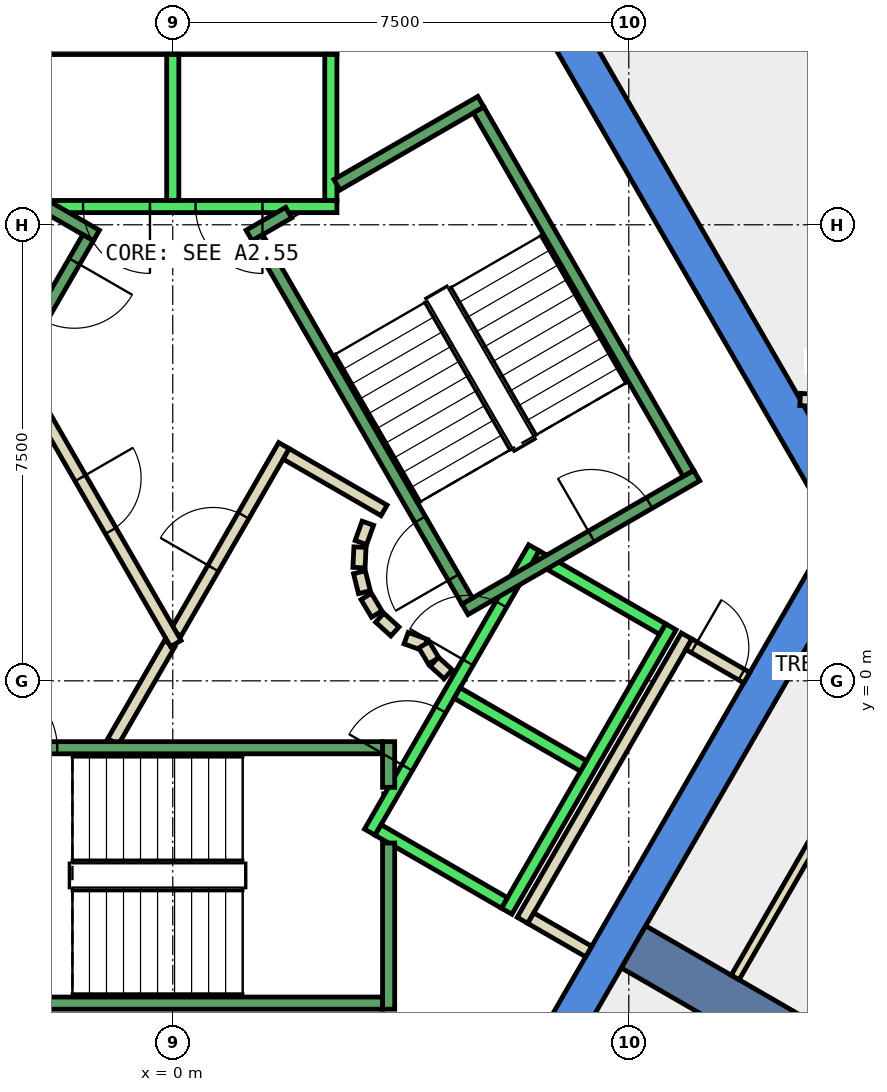
"""IFC4 building model, lengths in metres.
Left out: names, types, materials, properties, quantities, classifications, styles, units other than length and angle.
Written with IfcOpenShell. Run it as: python <this file> out.ifc"""

import sys

from ifc_helpers import new_model, si_unit, direction, frame, frame_2d, origin, place, context, subcontext, project, spatial, polyline, rectangle, outline, extrude, element, fill, save


model = new_model("IFC4")
c1 = context("Model", 3, precision=1e-05, world=origin(), true_north=direction((0.0, 1.0)))
c2 = subcontext(c1, "Body", "Model", "MODEL_VIEW")
j1 = project(units=[si_unit("LENGTHUNIT", "METRE"), si_unit("PLANEANGLEUNIT", "RADIAN")], contexts=[c1])
p1 = place(None, origin())
s1 = spatial("IfcSite", under=j1, at=p1, CompositionType="ELEMENT")
p2 = place(p1, origin())
s2 = spatial("IfcBuilding", under=s1, at=p2, CompositionType="ELEMENT")
p3 = place(p2, frame((0.0, 0.0, 263.0)))
s3 = spatial("IfcBuildingStorey", under=s2, at=p3, CompositionType="ELEMENT", Elevation=263.0)
p4 = place(p3, frame((0.0, 0.0, -0.34)))
e1 = element("IfcWall", 1, at=p4, inside=s3, PredefinedType="SHEAR", context=c2, shape_type="SweptSolid", body=[
    extrude(outline(polyline([(6.786, 10.747), (6.266, 10.447), (10.854, 2.5), (11.547, 2.5), (6.786, 10.747)])), origin(), (0.0, 0.0, 1.0), 3.6),
])
p5 = place(p3, frame((0.0, 0.0, -0.34)))
e2 = element("IfcWall", 2, at=p5, inside=s3, PredefinedType="SHEAR", context=c2, shape_type="SweptSolid", body=[
    extrude(outline(polyline([(5.774, -7.5), (11.547, 2.5), (10.854, 2.5), (5.427, -6.9), (5.774, -7.5)])), origin(), (0.0, 0.0, 1.0), 3.6),
])
p6 = place(p3, frame((7.578, -4.375, -0.34), z_axis=(0.0, 0.0, 1.0), x_axis=(0.866024315419, -0.5000018851, 0.0)))
e3 = element("IfcWall", 3, at=p6, inside=s3, PredefinedType="SHEAR", context=c2, shape_type="SweptSolid", body=[
    extrude(rectangle(XDim=9.0, YDim=0.8, at=frame_2d((4.5, 0.0))), origin(), (0.0, 0.0, 1.0), 3.6),
])
p7 = place(p3, frame((11.902, 4.521, 0.0), z_axis=(0.0, 0.0, 1.0), x_axis=(-0.997726217037, 0.067397298437, 0.0)))
e4 = element("IfcWall", 4, at=p7, inside=s3, PredefinedType="PARTITIONING", context=c2, shape_type="SweptSolid", body=[
    extrude(rectangle(XDim=1.587, YDim=0.2, at=frame_2d((0.793, 0.0))), origin(), (0.0, 0.0, 1.0), 3.26),
])
p8 = place(p7, frame((0.293, 0.0, 0.0)))
e5 = element("IfcOpeningElement", 5, at=p8, cuts=e4, PredefinedType="OPENING", context=c2, shape_type="SweptSolid", body=[
    extrude(rectangle(XDim=1.0, YDim=2.1, at=frame_2d((0.5, 1.05))), frame((0.0, 0.11, 0.0), z_axis=(0.0, -1.0, 0.0), x_axis=(1.0, 0.0, 0.0)), (0.0, 0.0, 1.0), 0.22),
])
p9 = place(p3, frame((9.281, 12.779, 0.0), z_axis=(0.0, 0.0, 1.0), x_axis=(0.515568955032, -0.856848091908, 0.0)))
e6 = element("IfcWall", 6, at=p9, inside=s3, PredefinedType="PARTITIONING", context=c2, shape_type="SweptSolid", body=[
    extrude(rectangle(XDim=3.177, YDim=0.2, at=frame_2d((1.588, 0.0))), origin(), (0.0, 0.0, 1.0), 3.26),
])
p10 = place(p3, frame((5.751, -3.938, 0.0), z_axis=(0.0, 0.0, 1.0), x_axis=(0.500034260056, 0.866005622828, 0.0)))
e7 = element("IfcWall", 7, at=p10, inside=s3, PredefinedType="PARTITIONING", context=c2, shape_type="SweptSolid", body=[
    extrude(rectangle(XDim=5.399, YDim=0.2, at=frame_2d((2.7, 0.0))), origin(), (0.0, 0.0, 1.0), 3.26),
])
p11 = place(p3, frame((8.488, 0.602, 0.0), z_axis=(0.0, 0.0, 1.0), x_axis=(0.866063652425, -0.499933745558, 0.0)))
e8 = element("IfcWall", 8, at=p11, inside=s3, PredefinedType="PARTITIONING", context=c2, shape_type="SweptSolid", body=[
    extrude(rectangle(XDim=1.1, YDim=0.2, at=frame_2d((0.55, 0.0))), origin(), (0.0, 0.0, 1.0), 3.26),
])
p12 = place(p11, frame((0.1, 0.0, 0.0)))
e9 = element("IfcOpeningElement", 9, at=p12, cuts=e8, PredefinedType="OPENING", context=c2, shape_type="SweptSolid", body=[
    extrude(rectangle(XDim=0.9, YDim=2.1, at=frame_2d((0.45, 1.05))), frame((0.0, 0.11, 0.0), z_axis=(0.0, -1.0, 0.0), x_axis=(1.0, 0.0, 0.0)), (0.0, 0.0, 1.0), 0.22),
])
p13 = place(p3, frame((6.841, -4.452, 0.0), z_axis=(0.0, 0.0, 1.0), x_axis=(-0.86621513555, 0.499671230855, 0.0)))
e10 = element("IfcWall", 10, at=p13, inside=s3, PredefinedType="PARTITIONING", context=c2, shape_type="SweptSolid", body=[
    extrude(rectangle(XDim=1.1, YDim=0.2, at=frame_2d((0.55, 0.0))), origin(), (0.0, 0.0, 1.0), 3.26),
])
p14 = place(p3, frame((-0.982, -1.0, 0.0), z_axis=(0.0, 0.0, 1.0), x_axis=(0.50024047865, 0.865886518847, 0.0)))
e11 = element("IfcWall", 11, at=p14, inside=s3, PredefinedType="PARTITIONING", context=c2, shape_type="SweptSolid", body=[
    extrude(rectangle(XDim=1.863, YDim=0.2, at=frame_2d((0.931, 0.0))), origin(), (0.0, 0.0, 1.0), 3.26),
])
p15 = place(p3, frame((0.05, 0.787, 0.0), z_axis=(0.0, 0.0, 1.0), x_axis=(0.499954076797, 0.866051915934, 0.0)))
e12 = element("IfcWall", 12, at=p15, inside=s3, PredefinedType="PARTITIONING", context=c2, shape_type="SweptSolid", body=[
    extrude(rectangle(XDim=3.558, YDim=0.2, at=frame_2d((1.779, 0.0))), origin(), (0.0, 0.0, 1.0), 3.26),
])
p16 = place(p15, frame((1.229, 0.0, 0.0)))
e13 = element("IfcOpeningElement", 13, at=p16, cuts=e12, PredefinedType="OPENING", context=c2, shape_type="SweptSolid", body=[
    extrude(rectangle(XDim=1.0, YDim=2.1, at=frame_2d((0.5, 1.05))), frame((0.0, 0.11, 0.0), z_axis=(0.0, -1.0, 0.0), x_axis=(1.0, 0.0, 0.0)), (0.0, 0.0, 1.0), 0.22),
])
p17 = place(p3, frame((1.866, 3.732, 0.0), z_axis=(0.0, 0.0, 1.0), x_axis=(0.866043361281, -0.499968895414, 0.0)))
e14 = element("IfcWall", 14, at=p17, inside=s3, PredefinedType="PARTITIONING", context=c2, shape_type="SweptSolid", body=[
    extrude(rectangle(XDim=1.858, YDim=0.2, at=frame_2d((0.929, 0.0))), origin(), (0.0, 0.0, 1.0), 3.26),
])
p18 = place(p3, frame((3.208, 2.592, 0.0), z_axis=(0.0, 0.0, 1.0), x_axis=(-0.337388820924, -0.941365382578, 0.0)))
e15 = element("IfcWall", 15, at=p18, inside=s3, PredefinedType="PARTITIONING", context=c2, shape_type="SweptSolid", body=[
    extrude(rectangle(XDim=0.338, YDim=0.2, at=frame_2d((0.169, 0.0))), origin(), (0.0, 0.0, 1.0), 3.26),
])
p19 = place(p3, frame((3.079, 2.199, 0.0), z_axis=(0.0, 0.0, 1.0), x_axis=(-0.047771483479, -0.998858290933, 0.0)))
e16 = element("IfcWall", 16, at=p19, inside=s3, PredefinedType="PARTITIONING", context=c2, shape_type="SweptSolid", body=[
    extrude(rectangle(XDim=0.337, YDim=0.2, at=frame_2d((0.169, 0.0))), origin(), (0.0, 0.0, 1.0), 3.26),
])
p20 = place(p3, frame((3.07, 1.786, 0.0), z_axis=(0.0, 0.0, 1.0), x_axis=(0.242705583207, -0.970099994784, 0.0)))
e17 = element("IfcWall", 17, at=p20, inside=s3, PredefinedType="PARTITIONING", context=c2, shape_type="SweptSolid", body=[
    extrude(rectangle(XDim=0.338, YDim=0.2, at=frame_2d((0.169, 0.0))), origin(), (0.0, 0.0, 1.0), 3.26),
])
for number, where, z_axis, x_axis in (
    (18, (3.182, 1.388, 0.0), (0.0, 0.0, 1.0), (0.512, -0.859, 0.0)),
    (19, (3.404, 1.039, 0.0), (0.0, 0.0, 1.0), (0.74, -0.672, 0.0)),
):
    element("IfcWall", number, at=place(p3, frame(where, z_axis=z_axis, x_axis=x_axis)), inside=s3, PredefinedType="PARTITIONING", context=c2, shape_type="SweptSolid", body=[
        extrude(rectangle(XDim=0.338, YDim=0.2, at=frame_2d((0.169, 0.0))), origin(), (0.0, 0.0, 1.0), 3.26),
    ])
p21 = place(p3, frame((3.838, 0.702, 0.0), z_axis=(0.0, 0.0, 1.0), x_axis=(0.941035081519, -0.338308993895, 0.0)))
e20 = element("IfcWall", 20, at=p21, inside=s3, PredefinedType="PARTITIONING", context=c2, shape_type="SweptSolid", body=[
    extrude(rectangle(XDim=0.337, YDim=0.2, at=frame_2d((0.168, 0.0))), origin(), (0.0, 0.0, 1.0), 3.26),
])
p22 = place(p3, frame((4.132, 0.593, 0.0), z_axis=(0.0, 0.0, 1.0), x_axis=(0.513561617048, -0.858052717201, 0.0)))
e21 = element("IfcWall", 21, at=p22, inside=s3, PredefinedType="PARTITIONING", context=c2, shape_type="SweptSolid", body=[
    extrude(rectangle(XDim=0.308, YDim=0.2, at=frame_2d((0.154, 0.0))), origin(), (0.0, 0.0, 1.0), 3.26),
])
p23 = place(p3, frame((4.301, 0.315, 0.0), z_axis=(0.0, 0.0, 1.0), x_axis=(0.741798017506, -0.670623367639, 0.0)))
e22 = element("IfcWall", 22, at=p23, inside=s3, PredefinedType="PARTITIONING", context=c2, shape_type="SweptSolid", body=[
    extrude(rectangle(XDim=0.309, YDim=0.2, at=frame_2d((0.154, 0.0))), origin(), (0.0, 0.0, 1.0), 3.26),
])
p24 = place(p3, frame((-2.54, 5.1, 0.0), z_axis=(0.0, 0.0, 1.0), x_axis=(0.499925051871, -0.866068670783, 0.0)))
e23 = element("IfcWall", 23, at=p24, inside=s3, PredefinedType="PARTITIONING", context=c2, shape_type="SweptSolid", body=[
    extrude(rectangle(XDim=5.181, YDim=0.2, at=frame_2d((2.59, 0.0))), origin(), (0.0, 0.0, 1.0), 3.26),
])
p25 = place(p24, frame((2.04, 0.0, 0.0)))
e24 = element("IfcOpeningElement", 24, at=p25, cuts=e23, PredefinedType="OPENING", context=c2, shape_type="SweptSolid", body=[
    extrude(rectangle(XDim=1.0, YDim=2.1, at=frame_2d((0.5, 1.05))), frame((0.0, 0.11, 0.0), z_axis=(0.0, -1.0, 0.0), x_axis=(1.0, 0.0, 0.0)), (0.0, 0.0, 1.0), 0.22),
])
p26 = place(p3, frame((9.25, -4.878, 0.0), z_axis=(0.0, 0.0, 1.0), x_axis=(0.499982416899, 0.866035555154, 0.0)))
e25 = element("IfcWall", 25, at=p26, inside=s3, PredefinedType="PARTITIONING", context=c2, shape_type="SweptSolid", body=[
    extrude(rectangle(XDim=8.048, YDim=0.15, at=frame_2d((4.024, 0.0))), origin(), (0.0, 0.0, 1.0), 3.26),
])
p27 = place(p3, frame((2.7, 7.8, 0.0), z_axis=(0.0, 0.0, 1.0), x_axis=(-1.0, 0.0, 0.0)))
e26 = element("IfcWall", 26, at=p27, inside=s3, PredefinedType="STANDARD", context=c2, shape_type="SweptSolid", body=[
    extrude(rectangle(XDim=5.4, YDim=0.2, at=frame_2d((2.7, 0.0))), origin(), (0.0, 0.0, 1.0), 3.26),
])
p28 = place(p27, frame((1.225, 0.0, 0.0)))
e27 = element("IfcOpeningElement", 27, at=p28, cuts=e26, PredefinedType="OPENING", context=c2, shape_type="SweptSolid", body=[
    extrude(rectangle(XDim=1.1, YDim=2.1, at=frame_2d((0.55, 1.05))), frame((0.0, 0.11, 0.0), z_axis=(0.0, -1.0, 0.0), x_axis=(1.0, 0.0, 0.0)), (0.0, 0.0, 1.0), 0.22),
])
p29 = place(p27, frame((3.075, 0.0, 0.0)))
e28 = element("IfcOpeningElement", 28, at=p29, cuts=e26, PredefinedType="OPENING", context=c2, shape_type="SweptSolid", body=[
    extrude(rectangle(XDim=1.1, YDim=2.1, at=frame_2d((0.55, 1.05))), frame((0.0, 0.11, 0.0), z_axis=(0.0, -1.0, 0.0), x_axis=(1.0, 0.0, 0.0)), (0.0, 0.0, 1.0), 0.22),
])
p30 = place(p3, frame((2.7, 10.4, 0.0), z_axis=(0.0, 0.0, 1.0), x_axis=(-1.0, 0.0, 0.0)))
e29 = element("IfcWall", 29, at=p30, inside=s3, PredefinedType="STANDARD", context=c2, shape_type="SweptSolid", body=[
    extrude(rectangle(XDim=5.4, YDim=0.2, at=frame_2d((2.7, 0.0))), origin(), (0.0, 0.0, 1.0), 3.26),
])
for number, where, z_axis, x_axis in (
    (30, (2.6, 7.9, 0.0), (0.0, 0.0, 1.0), (0.0, 1.0, 0.0)),
    (31, (0.0, 7.9, 0.0), (0.0, 0.0, 1.0), (0.0, 1.0, 0.0)),
):
    element("IfcWall", number, at=place(p3, frame(where, z_axis=z_axis, x_axis=x_axis)), inside=s3, PredefinedType="STANDARD", context=c2, shape_type="SweptSolid", body=[
        extrude(rectangle(XDim=2.4, YDim=0.2, at=frame_2d((1.2, 0.0))), origin(), (0.0, 0.0, 1.0), 3.26),
    ])
p31 = place(p3, frame((3.24, -2.488, 0.0), z_axis=(0.0, 0.0, 1.0), x_axis=(0.500034260056, 0.866005622828, 0.0)))
e32 = element("IfcWall", 32, at=p31, inside=s3, PredefinedType="STANDARD", context=c2, shape_type="SweptSolid", body=[
    extrude(rectangle(XDim=5.399, YDim=0.2, at=frame_2d((2.7, 0.0))), origin(), (0.0, 0.0, 1.0), 3.26),
])
p32 = place(p31, frame((3.225, 0.0, 0.0)))
e33 = element("IfcOpeningElement", 33, at=p32, cuts=e32, PredefinedType="OPENING", context=c2, shape_type="SweptSolid", body=[
    extrude(rectangle(XDim=1.1, YDim=2.1, at=frame_2d((0.55, 1.05))), frame((0.0, 0.11, 0.0), z_axis=(0.0, -1.0, 0.0), x_axis=(1.0, 0.0, 0.0)), (0.0, 0.0, 1.0), 0.22),
])
p33 = place(p31, frame((1.225, 0.0, 0.0)))
e34 = element("IfcOpeningElement", 34, at=p33, cuts=e32, PredefinedType="OPENING", context=c2, shape_type="SweptSolid", body=[
    extrude(rectangle(XDim=1.1, YDim=2.1, at=frame_2d((0.55, 1.05))), frame((0.0, 0.11, 0.0), z_axis=(0.0, -1.0, 0.0), x_axis=(1.0, 0.0, 0.0)), (0.0, 0.0, 1.0), 0.22),
])
p34 = place(p3, frame((5.492, -3.788, 0.0), z_axis=(0.0, 0.0, 1.0), x_axis=(0.500034260056, 0.866005622828, 0.0)))
e35 = element("IfcWall", 35, at=p34, inside=s3, PredefinedType="STANDARD", context=c2, shape_type="SweptSolid", body=[
    extrude(rectangle(XDim=5.399, YDim=0.2, at=frame_2d((2.7, 0.0))), origin(), (0.0, 0.0, 1.0), 3.26),
])
p35 = place(p3, frame((3.377, -2.452, 0.0), z_axis=(0.0, 0.0, 1.0), x_axis=(0.865955154139, -0.50012165622, 0.0)))
e36 = element("IfcWall", 36, at=p35, inside=s3, PredefinedType="STANDARD", context=c2, shape_type="SweptSolid", body=[
    extrude(rectangle(XDim=2.4, YDim=0.2, at=frame_2d((1.2, 0.0))), origin(), (0.0, 0.0, 1.0), 3.26),
])
for number, where, z_axis, x_axis in (
    (37, (4.677, -0.2, 0.0), (0.0, 0.0, 1.0), (0.866, -0.5, 0.0)),
    (38, (5.977, 2.052, 0.0), (0.0, 0.0, 1.0), (0.866, -0.5, 0.0)),
):
    element("IfcWall", number, at=place(p3, frame(where, z_axis=z_axis, x_axis=x_axis)), inside=s3, PredefinedType="STANDARD", context=c2, shape_type="SweptSolid", body=[
        extrude(rectangle(XDim=2.399, YDim=0.2, at=frame_2d((1.2, 0.0))), origin(), (0.0, 0.0, 1.0), 3.26),
    ])
p36 = place(p3, frame((3.55, -2.667, 0.0), z_axis=(0.0, 0.0, 1.0), x_axis=(0.0, -1.0, 0.0)))
e39 = element("IfcWall", 39, at=p36, inside=s3, PredefinedType="STANDARD", context=c2, shape_type="SweptSolid", body=[
    extrude(rectangle(XDim=2.733, YDim=0.2, at=frame_2d((1.366, 0.0))), origin(), (0.0, 0.0, 1.0), 3.26),
])
p37 = place(p3, frame((3.55, -1.0, 0.0), z_axis=(0.0, 0.0, 1.0), x_axis=(0.0, -1.0, 0.0)))
e40 = element("IfcWall", 40, at=p37, inside=s3, PredefinedType="STANDARD", context=c2, shape_type="SweptSolid", body=[
    extrude(rectangle(XDim=0.751, YDim=0.2, at=frame_2d((0.375, 0.0))), origin(), (0.0, 0.0, 1.0), 3.26),
])
p38 = place(p3, frame((-3.45, -1.1, 0.0), z_axis=(0.0, 0.0, 1.0), x_axis=(1.0, 0.0, 0.0)))
e41 = element("IfcWall", 41, at=p38, inside=s3, PredefinedType="STANDARD", context=c2, shape_type="SweptSolid", body=[
    extrude(rectangle(XDim=6.9, YDim=0.2, at=frame_2d((3.45, 0.0))), origin(), (0.0, 0.0, 1.0), 3.26),
])
p39 = place(p38, frame((0.45, 0.0, 0.0)))
e42 = element("IfcOpeningElement", 42, at=p39, cuts=e41, PredefinedType="OPENING", context=c2, shape_type="SweptSolid", body=[
    extrude(rectangle(XDim=1.1, YDim=2.2, at=frame_2d((0.55, 1.1))), frame((0.0, 0.11, 0.0), z_axis=(0.0, -1.0, 0.0), x_axis=(1.0, 0.0, 0.0)), (0.0, 0.0, 1.0), 0.22),
])
p40 = place(p3, frame((-3.45, -5.3, 0.0), z_axis=(0.0, 0.0, 1.0), x_axis=(1.0, 0.0, 0.0)))
e43 = element("IfcWall", 43, at=p40, inside=s3, PredefinedType="STANDARD", context=c2, shape_type="SweptSolid", body=[
    extrude(rectangle(XDim=6.9, YDim=0.2, at=frame_2d((3.45, 0.0))), origin(), (0.0, 0.0, 1.0), 3.26),
])
p41 = place(p3, frame((4.806, 1.176, 0.0), z_axis=(0.0, 0.0, 1.0), x_axis=(0.866059941101, 0.499940174841, 0.0)))
e44 = element("IfcWall", 44, at=p41, inside=s3, PredefinedType="STANDARD", context=c2, shape_type="SweptSolid", body=[
    extrude(rectangle(XDim=4.4, YDim=0.2, at=frame_2d((2.2, 0.0))), origin(), (0.0, 0.0, 1.0), 3.26),
])
p42 = place(p41, frame((2.4, 0.0, 0.0)))
e45 = element("IfcOpeningElement", 45, at=p42, cuts=e44, PredefinedType="OPENING", context=c2, shape_type="SweptSolid", body=[
    extrude(rectangle(XDim=1.1, YDim=2.2, at=frame_2d((0.55, 1.1))), frame((0.0, 0.11, 0.0), z_axis=(0.0, -1.0, 0.0), x_axis=(1.0, 0.0, 0.0)), (0.0, 0.0, 1.0), 0.22),
])
p43 = place(p3, frame((2.7, 8.158, 0.0), z_axis=(0.0, 0.0, 1.0), x_axis=(0.86611865017, 0.499838457731, 0.0)))
e46 = element("IfcWall", 46, at=p43, inside=s3, PredefinedType="STANDARD", context=c2, shape_type="SweptSolid", body=[
    extrude(rectangle(XDim=2.733, YDim=0.2, at=frame_2d((1.366, 0.0))), origin(), (0.0, 0.0, 1.0), 3.26),
])
p44 = place(p3, frame((1.256, 7.324, 0.0), z_axis=(0.0, 0.0, 1.0), x_axis=(0.865915093549, 0.500191014278, 0.0)))
e47 = element("IfcWall", 47, at=p44, inside=s3, PredefinedType="STANDARD", context=c2, shape_type="SweptSolid", body=[
    extrude(rectangle(XDim=0.752, YDim=0.2, at=frame_2d((0.376, 0.0))), origin(), (0.0, 0.0, 1.0), 3.26),
])
p45 = place(p3, frame((4.843, 1.312, 0.0), z_axis=(0.0, 0.0, 1.0), x_axis=(-0.499963383562, 0.866046543262, 0.0)))
e48 = element("IfcWall", 48, at=p45, inside=s3, PredefinedType="STANDARD", context=c2, shape_type="SweptSolid", body=[
    extrude(rectangle(XDim=6.9, YDim=0.2, at=frame_2d((3.45, 0.0))), origin(), (0.0, 0.0, 1.0), 3.26),
])
p46 = place(p45, frame((0.45, 0.0, 0.0)))
e49 = element("IfcOpeningElement", 49, at=p46, cuts=e48, PredefinedType="OPENING", context=c2, shape_type="SweptSolid", body=[
    extrude(rectangle(XDim=1.1, YDim=2.2, at=frame_2d((0.55, 1.1))), frame((0.0, 0.11, 0.0), z_axis=(0.0, -1.0, 0.0), x_axis=(1.0, 0.0, 0.0)), (0.0, 0.0, 1.0), 0.22),
])
p47 = place(p3, frame((8.48, 3.412, 0.0), z_axis=(0.0, 0.0, 1.0), x_axis=(-0.499978703459, 0.866037698999, 0.0)))
e50 = element("IfcWall", 50, at=p47, inside=s3, PredefinedType="STANDARD", context=c2, shape_type="SweptSolid", body=[
    extrude(rectangle(XDim=6.9, YDim=0.2, at=frame_2d((3.45, 0.0))), origin(), (0.0, 0.0, 1.0), 3.26),
])
p48 = place(p3, frame((-1.256, 7.324, 0.0), z_axis=(0.0, 0.0, 1.0), x_axis=(-0.866046073146, 0.499964197906, 0.0)))
e51 = element("IfcWall", 51, at=p48, inside=s3, PredefinedType="STANDARD", context=c2, shape_type="SweptSolid", body=[
    extrude(rectangle(XDim=4.4, YDim=0.2, at=frame_2d((2.2, 0.0))), origin(), (0.0, 0.0, 1.0), 3.26),
])
p49 = place(p48, frame((2.4, 0.0, 0.0)))
e52 = element("IfcOpeningElement", 52, at=p49, cuts=e51, PredefinedType="OPENING", context=c2, shape_type="SweptSolid", body=[
    extrude(rectangle(XDim=1.1, YDim=2.2, at=frame_2d((0.55, 1.1))), frame((0.0, 0.11, 0.0), z_axis=(0.0, -1.0, 0.0), x_axis=(1.0, 0.0, 0.0)), (0.0, 0.0, 1.0), 0.22),
])
p50 = place(p3, frame((-1.393, 7.288, 0.0), z_axis=(0.0, 0.0, 1.0), x_axis=(-0.499963383562, -0.866046543262, 0.0)))
e53 = element("IfcWall", 53, at=p50, inside=s3, PredefinedType="STANDARD", context=c2, shape_type="SweptSolid", body=[
    extrude(rectangle(XDim=6.9, YDim=0.2, at=frame_2d((3.45, 0.0))), origin(), (0.0, 0.0, 1.0), 3.26),
])
p51 = place(p50, frame((0.45, 0.0, 0.0)))
e54 = element("IfcOpeningElement", 54, at=p51, cuts=e53, PredefinedType="OPENING", context=c2, shape_type="SweptSolid", body=[
    extrude(rectangle(XDim=1.1, YDim=2.2, at=frame_2d((0.55, 1.1))), frame((0.0, 0.11, 0.0), z_axis=(0.0, -1.0, 0.0), x_axis=(1.0, 0.0, 0.0)), (0.0, 0.0, 1.0), 0.22),
])
p52 = place(p16, origin())
e55 = element("IfcDoor", 55, at=p52, inside=s3, OperationType="SINGLE_SWING_RIGHT", PredefinedType="DOOR", context=c2, shape_type="SweptSolid", body=[
    extrude(rectangle(XDim=1.0, YDim=2.1, at=frame_2d((0.5, 1.05))), frame((0.0, 0.025, 0.0), z_axis=(0.0, -1.0, 0.0), x_axis=(1.0, 0.0, 0.0)), (0.0, 0.0, 1.0), 0.05),
])
fill(e13, e55)
p53 = place(p25, origin())
e56 = element("IfcDoor", 56, at=p53, inside=s3, OperationType="SINGLE_SWING_RIGHT", PredefinedType="DOOR", context=c2, shape_type="SweptSolid", body=[
    extrude(rectangle(XDim=1.0, YDim=2.1, at=frame_2d((0.5, 1.05))), frame((0.0, 0.025, 0.0), z_axis=(0.0, -1.0, 0.0), x_axis=(1.0, 0.0, 0.0)), (0.0, 0.0, 1.0), 0.05),
])
fill(e24, e56)
p54 = place(p12, origin())
e57 = element("IfcDoor", 57, at=p54, inside=s3, OperationType="SINGLE_SWING_RIGHT", PredefinedType="DOOR", context=c2, shape_type="SweptSolid", body=[
    extrude(rectangle(XDim=0.9, YDim=2.1, at=frame_2d((0.45, 1.05))), frame((0.0, 0.025, 0.0), z_axis=(0.0, -1.0, 0.0), x_axis=(1.0, 0.0, 0.0)), (0.0, 0.0, 1.0), 0.05),
])
fill(e9, e57)
p55 = place(p28, origin())
e58 = element("IfcDoor", 58, at=p55, inside=s3, OperationType="SLIDING_TO_LEFT", PredefinedType="DOOR", context=c2, shape_type="SweptSolid", body=[
    extrude(rectangle(XDim=1.1, YDim=2.1, at=frame_2d((0.55, 1.05))), frame((0.0, 0.025, 0.0), z_axis=(0.0, -1.0, 0.0), x_axis=(1.0, 0.0, 0.0)), (0.0, 0.0, 1.0), 0.05),
])
fill(e27, e58)
p56 = place(p29, origin())
e59 = element("IfcDoor", 59, at=p56, inside=s3, OperationType="SLIDING_TO_LEFT", PredefinedType="DOOR", context=c2, shape_type="SweptSolid", body=[
    extrude(rectangle(XDim=1.1, YDim=2.1, at=frame_2d((0.55, 1.05))), frame((0.0, 0.025, 0.0), z_axis=(0.0, -1.0, 0.0), x_axis=(1.0, 0.0, 0.0)), (0.0, 0.0, 1.0), 0.05),
])
fill(e28, e59)
p57 = place(p32, origin())
e60 = element("IfcDoor", 60, at=p57, inside=s3, OperationType="SLIDING_TO_LEFT", PredefinedType="DOOR", context=c2, shape_type="SweptSolid", body=[
    extrude(rectangle(XDim=1.1, YDim=2.1, at=frame_2d((0.55, 1.05))), frame((0.0, 0.025, 0.0), z_axis=(0.0, -1.0, 0.0), x_axis=(1.0, 0.0, 0.0)), (0.0, 0.0, 1.0), 0.05),
])
fill(e33, e60)
p58 = place(p33, origin())
e61 = element("IfcDoor", 61, at=p58, inside=s3, OperationType="SLIDING_TO_LEFT", PredefinedType="DOOR", context=c2, shape_type="SweptSolid", body=[
    extrude(rectangle(XDim=1.1, YDim=2.1, at=frame_2d((0.55, 1.05))), frame((0.0, 0.025, 0.0), z_axis=(0.0, -1.0, 0.0), x_axis=(1.0, 0.0, 0.0)), (0.0, 0.0, 1.0), 0.05),
])
fill(e34, e61)
p59 = place(p39, origin())
e62 = element("IfcDoor", 62, at=p59, inside=s3, OperationType="SINGLE_SWING_LEFT", PredefinedType="DOOR", context=c2, shape_type="SweptSolid", body=[
    extrude(rectangle(XDim=1.1, YDim=2.2, at=frame_2d((0.55, 1.1))), frame((0.0, 0.025, 0.0), z_axis=(0.0, -1.0, 0.0), x_axis=(1.0, 0.0, 0.0)), (0.0, 0.0, 1.0), 0.05),
])
fill(e42, e62)
p60 = place(p46, origin())
e63 = element("IfcDoor", 63, at=p60, inside=s3, OperationType="SINGLE_SWING_LEFT", PredefinedType="DOOR", context=c2, shape_type="SweptSolid", body=[
    extrude(rectangle(XDim=1.1, YDim=2.2, at=frame_2d((0.55, 1.1))), frame((0.0, 0.025, 0.0), z_axis=(0.0, -1.0, 0.0), x_axis=(1.0, 0.0, 0.0)), (0.0, 0.0, 1.0), 0.05),
])
fill(e49, e63)
p61 = place(p42, origin())
e64 = element("IfcDoor", 64, at=p61, inside=s3, OperationType="SINGLE_SWING_LEFT", PredefinedType="DOOR", context=c2, shape_type="SweptSolid", body=[
    extrude(rectangle(XDim=1.1, YDim=2.2, at=frame_2d((0.55, 1.1))), frame((0.0, 0.025, 0.0), z_axis=(0.0, -1.0, 0.0), x_axis=(1.0, 0.0, 0.0)), (0.0, 0.0, 1.0), 0.05),
])
fill(e45, e64)
p62 = place(p51, origin())
e65 = element("IfcDoor", 65, at=p62, inside=s3, OperationType="SINGLE_SWING_LEFT", PredefinedType="DOOR", context=c2, shape_type="SweptSolid", body=[
    extrude(rectangle(XDim=1.1, YDim=2.2, at=frame_2d((0.55, 1.1))), frame((0.0, 0.025, 0.0), z_axis=(0.0, -1.0, 0.0), x_axis=(1.0, 0.0, 0.0)), (0.0, 0.0, 1.0), 0.05),
])
fill(e54, e65)
save(model, sys.argv[1])
